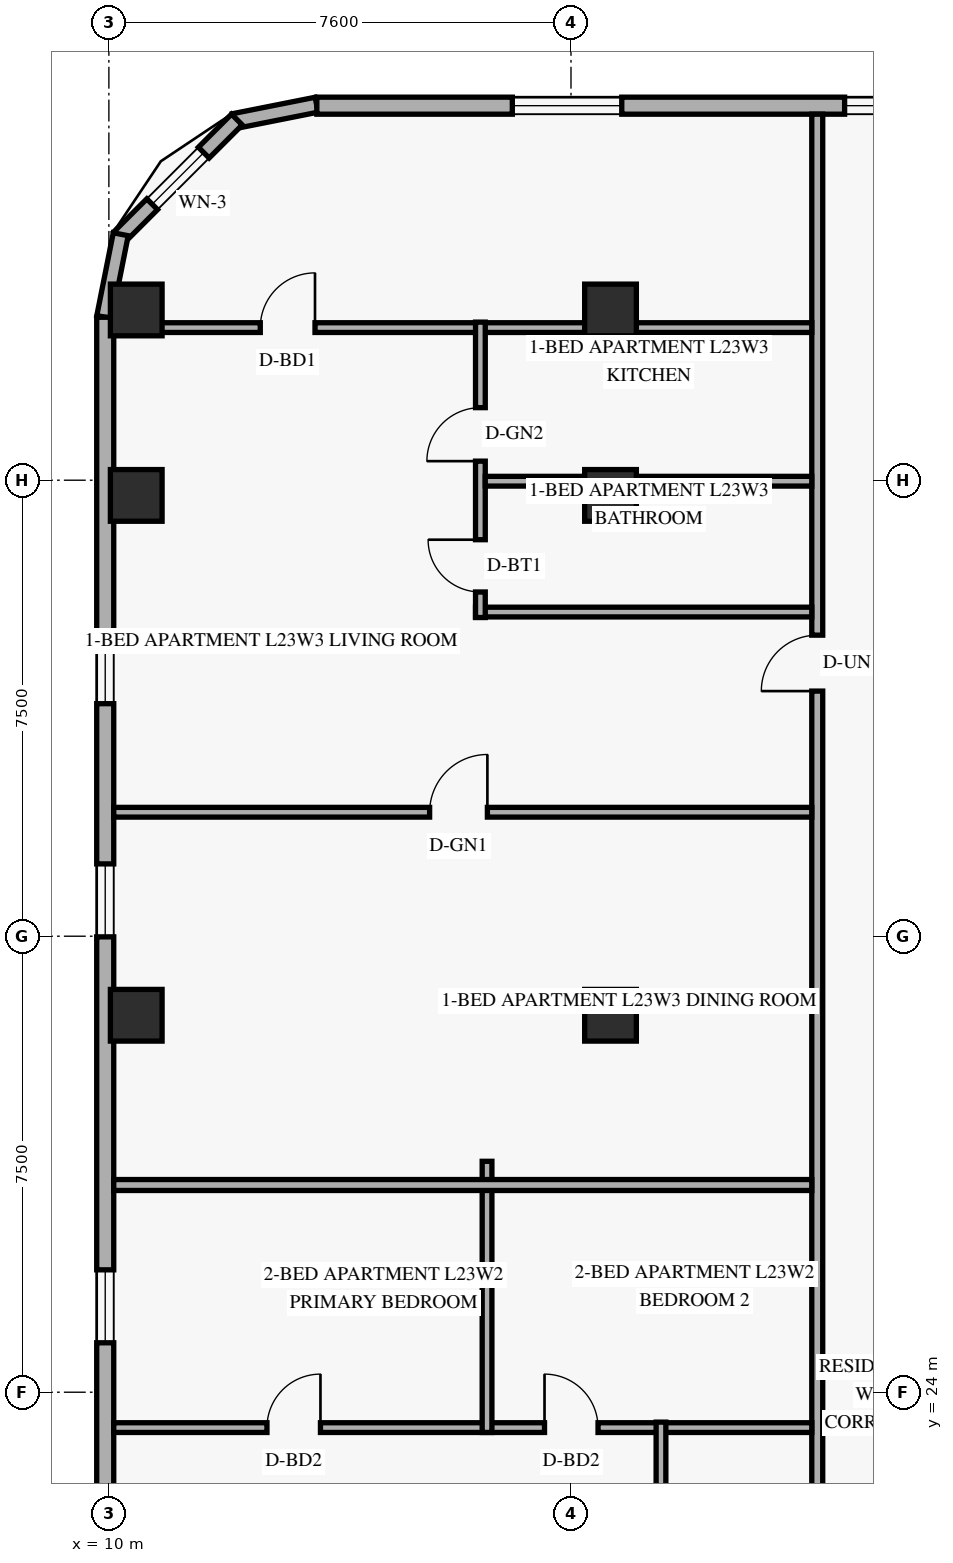
"""IFC4 building model, lengths in metres.
Left out: names, types, materials, properties, quantities, classifications, styles, units other than length and angle.
Written with IfcOpenShell. Run it as: python <this file> out.ifc"""

import sys

from ifc_helpers import new_model, si_unit, direction, frame, frame_2d, origin, origin_2d, place, context, subcontext, project, spatial, rectangle, extrude, element, fill, save


model = new_model("IFC4")
c1 = context("Model", 3, precision=1e-05, world=origin(), true_north=direction((0.0, 1.0)))
c2 = subcontext(c1, "Body", "Model", "MODEL_VIEW")
j1 = project(units=[si_unit("LENGTHUNIT", "METRE"), si_unit("PLANEANGLEUNIT", "RADIAN")], contexts=[c1])
p1 = place(None, origin())
s1 = spatial("IfcSite", under=j1, at=p1, CompositionType="ELEMENT")
p2 = place(p1, origin())
s2 = spatial("IfcBuilding", under=s1, at=p2, CompositionType="ELEMENT")
p3 = place(p2, frame((0.0, 0.0, 91.2)))
s3 = spatial("IfcBuildingStorey", under=s2, at=p3, CompositionType="ELEMENT", Elevation=91.2)
for number, where, z_axis, x_axis in (
    (1, (10.45, 30.2, 0.0), (0.0, 0.0, 1.0), (1.0, 0.0, 0.0)),
    (2, (10.45, 38.75, 0.0), (0.0, 0.0, 1.0), (1.0, 0.0, 0.0)),
    (3, (10.45, 41.8, 0.0), (0.0, 0.0, 1.0), (1.0, 0.0, 0.0)),
    (4, (18.25, 30.2, 0.0), (0.0, 0.0, 1.0), (1.0, 0.0, 0.0)),
    (5, (18.25, 38.75, 0.0), (0.0, 0.0, 1.0), (1.0, 0.0, 0.0)),
    (6, (18.25, 41.8, 0.0), (0.0, 0.0, 1.0), (1.0, 0.0, 0.0)),
):
    element("IfcColumn", number, at=place(p3, frame(where, z_axis=z_axis, x_axis=x_axis)), inside=s3, PredefinedType="COLUMN", context=c2, shape_type="SweptSolid", body=[
        extrude(rectangle(XDim=0.85, YDim=0.85, at=origin_2d()), origin(), (0.0, 0.0, 1.0), 3.6),
    ])
p4 = place(p3, frame((13.417, 45.176, 0.0), z_axis=(0.0, 0.0, 1.0), x_axis=(-0.980809899341, -0.19496651342, 0.0)))
e7 = element("IfcWall", 7, at=p4, inside=s3, PredefinedType="SOLIDWALL", context=c2, shape_type="SweptSolid", body=[
    extrude(rectangle(XDim=1.389, YDim=0.25, at=frame_2d((0.694, 0.0))), origin(), (0.0, 0.0, 1.0), 3.36),
])
p5 = place(p3, frame((12.105, 44.932, 0.0), z_axis=(0.0, 0.0, 1.0), x_axis=(-0.707151344399, -0.707062215165, 0.0)))
e8 = element("IfcWall", 8, at=p5, inside=s3, PredefinedType="SOLIDWALL", context=c2, shape_type="SweptSolid", body=[
    extrude(rectangle(XDim=2.739, YDim=0.25, at=frame_2d((1.37, 0.0))), origin(), (0.0, 0.0, 1.0), 3.36),
])
p6 = place(p5, frame((0.77, 0.0, 0.85)))
e9 = element("IfcOpeningElement", 9, at=p6, cuts=e8, PredefinedType="OPENING", context=c2, shape_type="SweptSolid", body=[
    extrude(rectangle(XDim=1.2, YDim=1.5, at=frame_2d((0.6, 0.75))), frame((0.0, 0.135, 0.0), z_axis=(0.0, -1.0, 0.0), x_axis=(1.0, 0.0, 0.0)), (0.0, 0.0, 1.0), 0.27),
])
p7 = place(p3, frame((10.195, 43.045, 0.0), z_axis=(0.0, 0.0, 1.0), x_axis=(-0.195000137217, -0.980803214965, 0.0)))
e10 = element("IfcWall", 10, at=p7, inside=s3, PredefinedType="SOLIDWALL", context=c2, shape_type="SweptSolid", body=[
    extrude(rectangle(XDim=1.388, YDim=0.25, at=frame_2d((0.694, 0.0))), origin(), (0.0, 0.0, 1.0), 3.36),
])
p8 = place(p3, frame((49.98, 45.16, 0.0), z_axis=(0.0, 0.0, 1.0), x_axis=(-1.0, 0.0, 0.0)))
e11 = element("IfcWall", 11, at=p8, inside=s3, PredefinedType="SOLIDWALL", context=c2, shape_type="SweptSolid", body=[
    extrude(rectangle(XDim=36.56, YDim=0.28, at=frame_2d((18.28, 0.0))), origin(), (0.0, 0.0, 1.0), 3.36),
])
p9 = place(p8, frame((31.545, 0.0, 0.85)))
e12 = element("IfcOpeningElement", 12, at=p9, cuts=e11, PredefinedType="OPENING", context=c2, shape_type="SweptSolid", body=[
    extrude(rectangle(XDim=1.8, YDim=1.6, at=frame_2d((0.9, 0.8))), frame((0.0, 0.15, 0.0), z_axis=(0.0, -1.0, 0.0), x_axis=(1.0, 0.0, 0.0)), (0.0, 0.0, 1.0), 0.3),
])
p10 = place(p8, frame((26.68, 0.0, 0.85)))
e13 = element("IfcOpeningElement", 13, at=p10, cuts=e11, PredefinedType="OPENING", context=c2, shape_type="SweptSolid", body=[
    extrude(rectangle(XDim=1.2, YDim=1.5, at=frame_2d((0.6, 0.75))), frame((0.0, 0.15, 0.0), z_axis=(0.0, -1.0, 0.0), x_axis=(1.0, 0.0, 0.0)), (0.0, 0.0, 1.0), 0.3),
])
p11 = place(p8, frame((22.237, 0.0, 0.85)))
e14 = element("IfcOpeningElement", 14, at=p11, cuts=e11, PredefinedType="OPENING", context=c2, shape_type="SweptSolid", body=[
    extrude(rectangle(XDim=1.8, YDim=1.6, at=frame_2d((0.9, 0.8))), frame((0.0, 0.15, 0.0), z_axis=(0.0, -1.0, 0.0), x_axis=(1.0, 0.0, 0.0)), (0.0, 0.0, 1.0), 0.3),
])
p12 = place(p8, frame((16.402, 0.0, 0.85)))
e15 = element("IfcOpeningElement", 15, at=p12, cuts=e11, PredefinedType="OPENING", context=c2, shape_type="SweptSolid", body=[
    extrude(rectangle(XDim=1.8, YDim=1.6, at=frame_2d((0.9, 0.8))), frame((0.0, 0.15, 0.0), z_axis=(0.0, -1.0, 0.0), x_axis=(1.0, 0.0, 0.0)), (0.0, 0.0, 1.0), 0.3),
])
p13 = place(p8, frame((12.895, 0.0, 0.85)))
e16 = element("IfcOpeningElement", 16, at=p13, cuts=e11, PredefinedType="OPENING", context=c2, shape_type="SweptSolid", body=[
    extrude(rectangle(XDim=1.2, YDim=1.5, at=frame_2d((0.6, 0.75))), frame((0.0, 0.15, 0.0), z_axis=(0.0, -1.0, 0.0), x_axis=(1.0, 0.0, 0.0)), (0.0, 0.0, 1.0), 0.3),
])
p14 = place(p8, frame((8.017, 0.0, 0.85)))
e17 = element("IfcOpeningElement", 17, at=p14, cuts=e11, PredefinedType="OPENING", context=c2, shape_type="SweptSolid", body=[
    extrude(rectangle(XDim=1.8, YDim=1.6, at=frame_2d((0.9, 0.8))), frame((0.0, 0.15, 0.0), z_axis=(0.0, -1.0, 0.0), x_axis=(1.0, 0.0, 0.0)), (0.0, 0.0, 1.0), 0.3),
])
p15 = place(p8, frame((1.802, 0.0, 0.85)))
e18 = element("IfcOpeningElement", 18, at=p15, cuts=e11, PredefinedType="OPENING", context=c2, shape_type="SweptSolid", body=[
    extrude(rectangle(XDim=1.8, YDim=1.6, at=frame_2d((0.9, 0.8))), frame((0.0, 0.15, 0.0), z_axis=(0.0, -1.0, 0.0), x_axis=(1.0, 0.0, 0.0)), (0.0, 0.0, 1.0), 0.3),
])
p16 = place(p3, frame((9.94, 41.68, 0.0), z_axis=(0.0, 0.0, 1.0), x_axis=(0.0, -1.0, 0.0)))
e19 = element("IfcWall", 19, at=p16, inside=s3, PredefinedType="SOLIDWALL", context=c2, shape_type="SweptSolid", body=[
    extrude(rectangle(XDim=35.36, YDim=0.28, at=frame_2d((17.68, 0.0))), origin(), (0.0, 0.0, 1.0), 3.36),
])
p17 = place(p16, frame((29.347, 0.0, 0.85)))
e20 = element("IfcOpeningElement", 20, at=p17, cuts=e19, PredefinedType="OPENING", context=c2, shape_type="SweptSolid", body=[
    extrude(rectangle(XDim=1.2, YDim=1.5, at=frame_2d((0.6, 0.75))), frame((0.0, 0.15, 0.0), z_axis=(0.0, -1.0, 0.0), x_axis=(1.0, 0.0, 0.0)), (0.0, 0.0, 1.0), 0.3),
])
p18 = place(p16, frame((25.867, 0.0, 0.85)))
e21 = element("IfcOpeningElement", 21, at=p18, cuts=e19, PredefinedType="OPENING", context=c2, shape_type="SweptSolid", body=[
    extrude(rectangle(XDim=1.2, YDim=1.5, at=frame_2d((0.6, 0.75))), frame((0.0, 0.15, 0.0), z_axis=(0.0, -1.0, 0.0), x_axis=(1.0, 0.0, 0.0)), (0.0, 0.0, 1.0), 0.3),
])
p19 = place(p16, frame((20.376, 0.0, 0.85)))
e22 = element("IfcOpeningElement", 22, at=p19, cuts=e19, PredefinedType="OPENING", context=c2, shape_type="SweptSolid", body=[
    extrude(rectangle(XDim=1.2, YDim=1.5, at=frame_2d((0.6, 0.75))), frame((0.0, 0.15, 0.0), z_axis=(0.0, -1.0, 0.0), x_axis=(1.0, 0.0, 0.0)), (0.0, 0.0, 1.0), 0.3),
])
p20 = place(p16, frame((15.667, 0.0, 0.85)))
e23 = element("IfcOpeningElement", 23, at=p20, cuts=e19, PredefinedType="OPENING", context=c2, shape_type="SweptSolid", body=[
    extrude(rectangle(XDim=1.2, YDim=1.5, at=frame_2d((0.6, 0.75))), frame((0.0, 0.15, 0.0), z_axis=(0.0, -1.0, 0.0), x_axis=(1.0, 0.0, 0.0)), (0.0, 0.0, 1.0), 0.3),
])
p21 = place(p16, frame((8.99, 0.0, 0.85)))
e24 = element("IfcOpeningElement", 24, at=p21, cuts=e19, PredefinedType="OPENING", context=c2, shape_type="SweptSolid", body=[
    extrude(rectangle(XDim=1.2, YDim=1.5, at=frame_2d((0.6, 0.75))), frame((0.0, 0.15, 0.0), z_axis=(0.0, -1.0, 0.0), x_axis=(1.0, 0.0, 0.0)), (0.0, 0.0, 1.0), 0.3),
])
p22 = place(p16, frame((5.156, 0.0, 0.85)))
e25 = element("IfcOpeningElement", 25, at=p22, cuts=e19, PredefinedType="OPENING", context=c2, shape_type="SweptSolid", body=[
    extrude(rectangle(XDim=1.2, YDim=1.5, at=frame_2d((0.6, 0.75))), frame((0.0, 0.15, 0.0), z_axis=(0.0, -1.0, 0.0), x_axis=(1.0, 0.0, 0.0)), (0.0, 0.0, 1.0), 0.3),
])
p23 = place(p3, frame((21.65, 2.98, 0.0), z_axis=(0.0, 0.0, 1.0), x_axis=(0.0, 1.0, 0.0)))
e26 = element("IfcWall", 26, at=p23, inside=s3, PredefinedType="STANDARD", context=c2, shape_type="SweptSolid", body=[
    extrude(rectangle(XDim=42.04, YDim=0.18, at=frame_2d((21.02, 0.0))), origin(), (0.0, 0.0, 1.0), 2.731),
])
p24 = place(p23, frame((4.856, 0.0, 0.0)))
e27 = element("IfcOpeningElement", 27, at=p24, cuts=e26, PredefinedType="OPENING", context=c2, shape_type="SweptSolid", body=[
    extrude(rectangle(XDim=0.92, YDim=2.15, at=frame_2d((0.46, 1.075))), frame((0.0, 0.1, 0.0), z_axis=(0.0, -1.0, 0.0), x_axis=(1.0, 0.0, 0.0)), (0.0, 0.0, 1.0), 0.2),
])
p25 = place(p23, frame((14.488, 0.0, 0.0)))
e28 = element("IfcOpeningElement", 28, at=p25, cuts=e26, PredefinedType="OPENING", context=c2, shape_type="SweptSolid", body=[
    extrude(rectangle(XDim=0.92, YDim=2.15, at=frame_2d((0.46, 1.075))), frame((0.0, 0.1, 0.0), z_axis=(0.0, -1.0, 0.0), x_axis=(1.0, 0.0, 0.0)), (0.0, 0.0, 1.0), 0.2),
])
p26 = place(p23, frame((32.552, 0.0, 0.0)))
e29 = element("IfcOpeningElement", 29, at=p26, cuts=e26, PredefinedType="OPENING", context=c2, shape_type="SweptSolid", body=[
    extrude(rectangle(XDim=0.92, YDim=2.15, at=frame_2d((0.46, 1.075))), frame((0.0, 0.1, 0.0), z_axis=(0.0, -1.0, 0.0), x_axis=(1.0, 0.0, 0.0)), (0.0, 0.0, 1.0), 0.2),
])
p27 = place(p3, frame((10.08, 23.418, 0.0), z_axis=(0.0, 0.0, 1.0), x_axis=(1.0, 0.0, 0.0)))
e30 = element("IfcWall", 30, at=p27, inside=s3, PredefinedType="PARTITIONING", context=c2, shape_type="SweptSolid", body=[
    extrude(rectangle(XDim=11.48, YDim=0.16, at=frame_2d((5.74, 0.0))), origin(), (0.0, 0.0, 1.0), 2.731),
])
p28 = place(p27, frame((2.52, 0.0, 0.0)))
e31 = element("IfcOpeningElement", 31, at=p28, cuts=e30, PredefinedType="OPENING", context=c2, shape_type="SweptSolid", body=[
    extrude(rectangle(XDim=0.88, YDim=2.14, at=frame_2d((0.44, 1.07))), frame((0.0, 0.09, 0.0), z_axis=(0.0, -1.0, 0.0), x_axis=(1.0, 0.0, 0.0)), (0.0, 0.0, 1.0), 0.18),
])
p29 = place(p27, frame((7.085, 0.0, 0.0)))
e32 = element("IfcOpeningElement", 32, at=p29, cuts=e30, PredefinedType="OPENING", context=c2, shape_type="SweptSolid", body=[
    extrude(rectangle(XDim=0.88, YDim=2.14, at=frame_2d((0.44, 1.07))), frame((0.0, 0.09, 0.0), z_axis=(0.0, -1.0, 0.0), x_axis=(1.0, 0.0, 0.0)), (0.0, 0.0, 1.0), 0.18),
])
p30 = place(p3, frame((19.08, 18.678, 0.0), z_axis=(0.0, 0.0, 1.0), x_axis=(0.0, 1.0, 0.0)))
e33 = element("IfcWall", 33, at=p30, inside=s3, PredefinedType="PLUMBINGWALL", context=c2, shape_type="SweptSolid", body=[
    extrude(rectangle(XDim=4.83, YDim=0.16, at=frame_2d((2.415, 0.0))), origin(), (0.0, 0.0, 1.0), 3.36),
])
p31 = place(p30, frame((0.42, 0.0, 0.0)))
e34 = element("IfcOpeningElement", 34, at=p31, cuts=e33, PredefinedType="OPENING", context=c2, shape_type="SweptSolid", body=[
    extrude(rectangle(XDim=0.86, YDim=2.12, at=frame_2d((0.43, 1.06))), frame((0.0, 0.09, 0.0), z_axis=(0.0, -1.0, 0.0), x_axis=(1.0, 0.0, 0.0)), (0.0, 0.0, 1.0), 0.18),
])
p32 = place(p30, frame((2.559, 0.0, 0.0)))
e35 = element("IfcOpeningElement", 35, at=p32, cuts=e33, PredefinedType="OPENING", context=c2, shape_type="SweptSolid", body=[
    extrude(rectangle(XDim=0.88, YDim=2.12, at=frame_2d((0.44, 1.06))), frame((0.0, 0.09, 0.0), z_axis=(0.0, -1.0, 0.0), x_axis=(1.0, 0.0, 0.0)), (0.0, 0.0, 1.0), 0.18),
])
p33 = place(p3, frame((16.219, 23.338, 0.0), z_axis=(0.0, 0.0, 1.0), x_axis=(0.0, 1.0, 0.0)))
e36 = element("IfcWall", 36, at=p33, inside=s3, PredefinedType="PARTITIONING", context=c2, shape_type="SweptSolid", body=[
    extrude(rectangle(XDim=4.46, YDim=0.16, at=frame_2d((2.23, 0.0))), origin(), (0.0, 0.0, 1.0), 2.731),
])
p34 = place(p3, frame((10.08, 27.408, 0.0), z_axis=(0.0, 0.0, 1.0), x_axis=(1.0, 0.0, 0.0)))
e37 = element("IfcWall", 37, at=p34, inside=s3, PredefinedType="PARTITIONING", context=c2, shape_type="SweptSolid", body=[
    extrude(rectangle(XDim=11.48, YDim=0.18, at=frame_2d((5.74, 0.0))), origin(), (0.0, 0.0, 1.0), 2.731),
])
p35 = place(p3, frame((10.08, 41.51, 0.0), z_axis=(0.0, 0.0, 1.0), x_axis=(1.0, 0.0, 0.0)))
e38 = element("IfcWall", 38, at=p35, inside=s3, PredefinedType="PARTITIONING", context=c2, shape_type="SweptSolid", body=[
    extrude(rectangle(XDim=11.48, YDim=0.16, at=frame_2d((5.74, 0.0))), origin(), (0.0, 0.0, 1.0), 3.36),
])
p36 = place(p35, frame((2.41, 0.0, 0.0)))
e39 = element("IfcOpeningElement", 39, at=p36, cuts=e38, PredefinedType="OPENING", context=c2, shape_type="SweptSolid", body=[
    extrude(rectangle(XDim=0.9, YDim=2.14, at=frame_2d((0.45, 1.07))), frame((0.0, 0.09, 0.0), z_axis=(0.0, -1.0, 0.0), x_axis=(1.0, 0.0, 0.0)), (0.0, 0.0, 1.0), 0.18),
])
p37 = place(p3, frame((16.03, 36.832, 0.0), z_axis=(0.0, 0.0, 1.0), x_axis=(1.0, 0.0, 0.0)))
e40 = element("IfcWall", 40, at=p37, inside=s3, PredefinedType="PLUMBINGWALL", context=c2, shape_type="SweptSolid", body=[
    extrude(rectangle(XDim=5.53, YDim=0.16, at=frame_2d((2.765, 0.0))), origin(), (0.0, 0.0, 1.0), 2.731),
])
p38 = place(p3, frame((16.11, 36.741, 0.0), z_axis=(0.0, 0.0, 1.0), x_axis=(0.0, 1.0, 0.0)))
e41 = element("IfcWall", 41, at=p38, inside=s3, PredefinedType="PLUMBINGWALL", context=c2, shape_type="SweptSolid", body=[
    extrude(rectangle(XDim=4.859, YDim=0.16, at=frame_2d((2.429, 0.0))), origin(), (0.0, 0.0, 1.0), 2.731),
])
p39 = place(p38, frame((0.42, 0.0, 0.0)))
e42 = element("IfcOpeningElement", 42, at=p39, cuts=e41, PredefinedType="OPENING", context=c2, shape_type="SweptSolid", body=[
    extrude(rectangle(XDim=0.86, YDim=2.12, at=frame_2d((0.43, 1.06))), frame((0.0, 0.09, 0.0), z_axis=(0.0, -1.0, 0.0), x_axis=(1.0, 0.0, 0.0)), (0.0, 0.0, 1.0), 0.18),
])
p40 = place(p38, frame((2.572, 0.0, 0.0)))
e43 = element("IfcOpeningElement", 43, at=p40, cuts=e41, PredefinedType="OPENING", context=c2, shape_type="SweptSolid", body=[
    extrude(rectangle(XDim=0.88, YDim=2.12, at=frame_2d((0.44, 1.06))), frame((0.0, 0.09, 0.0), z_axis=(0.0, -1.0, 0.0), x_axis=(1.0, 0.0, 0.0)), (0.0, 0.0, 1.0), 0.18),
])
p41 = place(p3, frame((16.19, 38.984, 0.0), z_axis=(0.0, 0.0, 1.0), x_axis=(1.0, 0.0, 0.0)))
e44 = element("IfcWall", 44, at=p41, inside=s3, PredefinedType="PLUMBINGWALL", context=c2, shape_type="SweptSolid", body=[
    extrude(rectangle(XDim=5.37, YDim=0.16, at=frame_2d((2.685, 0.0))), origin(), (0.0, 0.0, 1.0), 2.731),
])
p42 = place(p3, frame((10.08, 33.539, 0.0), z_axis=(0.0, 0.0, 1.0), x_axis=(1.0, 0.0, 0.0)))
e45 = element("IfcWall", 45, at=p42, inside=s3, PredefinedType="PARTITIONING", context=c2, shape_type="SweptSolid", body=[
    extrude(rectangle(XDim=11.48, YDim=0.16, at=frame_2d((5.74, 0.0))), origin(), (0.0, 0.0, 1.0), 2.731),
])
p43 = place(p42, frame((5.195, 0.0, 0.0)))
e46 = element("IfcOpeningElement", 46, at=p43, cuts=e45, PredefinedType="OPENING", context=c2, shape_type="SweptSolid", body=[
    extrude(rectangle(XDim=0.95, YDim=2.15, at=frame_2d((0.475, 1.075))), frame((0.0, 0.09, 0.0), z_axis=(0.0, -1.0, 0.0), x_axis=(1.0, 0.0, 0.0)), (0.0, 0.0, 1.0), 0.18),
])
p44 = place(p6, origin())
e47 = element("IfcWindow", 47, at=p44, inside=s3, PartitioningType="SINGLE_PANEL", PredefinedType="WINDOW", context=c2, shape_type="SweptSolid", body=[
    extrude(rectangle(XDim=1.2, YDim=1.5, at=frame_2d((0.6, 0.75))), frame((0.0, 0.03, 0.0), z_axis=(0.0, -1.0, 0.0), x_axis=(1.0, 0.0, 0.0)), (0.0, 0.0, 1.0), 0.06),
])
fill(e9, e47)
p45 = place(p9, origin())
e48 = element("IfcWindow", 48, at=p45, inside=s3, PartitioningType="SINGLE_PANEL", PredefinedType="WINDOW", context=c2, shape_type="SweptSolid", body=[
    extrude(rectangle(XDim=1.8, YDim=1.6, at=frame_2d((0.9, 0.8))), frame((0.0, 0.03, 0.0), z_axis=(0.0, -1.0, 0.0), x_axis=(1.0, 0.0, 0.0)), (0.0, 0.0, 1.0), 0.06),
])
fill(e12, e48)
p46 = place(p10, origin())
e49 = element("IfcWindow", 49, at=p46, inside=s3, PartitioningType="SINGLE_PANEL", PredefinedType="WINDOW", context=c2, shape_type="SweptSolid", body=[
    extrude(rectangle(XDim=1.2, YDim=1.5, at=frame_2d((0.6, 0.75))), frame((0.0, 0.03, 0.0), z_axis=(0.0, -1.0, 0.0), x_axis=(1.0, 0.0, 0.0)), (0.0, 0.0, 1.0), 0.06),
])
fill(e13, e49)
p47 = place(p20, origin())
e50 = element("IfcWindow", 50, at=p47, inside=s3, PartitioningType="SINGLE_PANEL", PredefinedType="WINDOW", context=c2, shape_type="SweptSolid", body=[
    extrude(rectangle(XDim=1.2, YDim=1.5, at=frame_2d((0.6, 0.75))), frame((0.0, 0.03, 0.0), z_axis=(0.0, -1.0, 0.0), x_axis=(1.0, 0.0, 0.0)), (0.0, 0.0, 1.0), 0.06),
])
fill(e23, e50)
p48 = place(p21, origin())
e51 = element("IfcWindow", 51, at=p48, inside=s3, PartitioningType="SINGLE_PANEL", PredefinedType="WINDOW", context=c2, shape_type="SweptSolid", body=[
    extrude(rectangle(XDim=1.2, YDim=1.5, at=frame_2d((0.6, 0.75))), frame((0.0, 0.03, 0.0), z_axis=(0.0, -1.0, 0.0), x_axis=(1.0, 0.0, 0.0)), (0.0, 0.0, 1.0), 0.06),
])
fill(e24, e51)
p49 = place(p22, origin())
e52 = element("IfcWindow", 52, at=p49, inside=s3, PartitioningType="SINGLE_PANEL", PredefinedType="WINDOW", context=c2, shape_type="SweptSolid", body=[
    extrude(rectangle(XDim=1.2, YDim=1.5, at=frame_2d((0.6, 0.75))), frame((0.0, 0.03, 0.0), z_axis=(0.0, -1.0, 0.0), x_axis=(1.0, 0.0, 0.0)), (0.0, 0.0, 1.0), 0.06),
])
fill(e25, e52)
p50 = place(p28, origin())
e53 = element("IfcDoor", 53, at=p50, inside=s3, OperationType="SINGLE_SWING_RIGHT", PredefinedType="DOOR", context=c2, shape_type="SweptSolid", body=[
    extrude(rectangle(XDim=0.88, YDim=2.14, at=frame_2d((0.44, 1.07))), frame((0.0, 0.025, 0.0), z_axis=(0.0, -1.0, 0.0), x_axis=(1.0, 0.0, 0.0)), (0.0, 0.0, 1.0), 0.05),
])
fill(e31, e53)
p51 = place(p29, origin())
e54 = element("IfcDoor", 54, at=p51, inside=s3, OperationType="SINGLE_SWING_LEFT", PredefinedType="DOOR", context=c2, shape_type="SweptSolid", body=[
    extrude(rectangle(XDim=0.88, YDim=2.14, at=frame_2d((0.44, 1.07))), frame((0.0, 0.025, 0.0), z_axis=(0.0, -1.0, 0.0), x_axis=(1.0, 0.0, 0.0)), (0.0, 0.0, 1.0), 0.05),
])
fill(e32, e54)
p52 = place(p43, origin())
e55 = element("IfcDoor", 55, at=p52, inside=s3, OperationType="SINGLE_SWING_RIGHT", PredefinedType="DOOR", context=c2, shape_type="SweptSolid", body=[
    extrude(rectangle(XDim=0.95, YDim=2.15, at=frame_2d((0.475, 1.075))), frame((0.0, 0.025, 0.0), z_axis=(0.0, -1.0, 0.0), x_axis=(1.0, 0.0, 0.0)), (0.0, 0.0, 1.0), 0.05),
])
fill(e46, e55)
p53 = place(p26, origin())
e56 = element("IfcDoor", 56, at=p53, inside=s3, OperationType="SINGLE_SWING_LEFT", PredefinedType="DOOR", context=c2, shape_type="SweptSolid", body=[
    extrude(rectangle(XDim=0.92, YDim=2.15, at=frame_2d((0.46, 1.075))), frame((0.0, 0.025, 0.0), z_axis=(0.0, -1.0, 0.0), x_axis=(1.0, 0.0, 0.0)), (0.0, 0.0, 1.0), 0.05),
])
fill(e29, e56)
p54 = place(p39, origin())
e57 = element("IfcDoor", 57, at=p54, inside=s3, OperationType="SINGLE_SWING_RIGHT", PredefinedType="DOOR", context=c2, shape_type="SweptSolid", body=[
    extrude(rectangle(XDim=0.86, YDim=2.12, at=frame_2d((0.43, 1.06))), frame((0.0, 0.025, 0.0), z_axis=(0.0, -1.0, 0.0), x_axis=(1.0, 0.0, 0.0)), (0.0, 0.0, 1.0), 0.05),
])
fill(e42, e57)
p55 = place(p40, origin())
e58 = element("IfcDoor", 58, at=p55, inside=s3, OperationType="SINGLE_SWING_LEFT", PredefinedType="DOOR", context=c2, shape_type="SweptSolid", body=[
    extrude(rectangle(XDim=0.88, YDim=2.12, at=frame_2d((0.44, 1.06))), frame((0.0, 0.025, 0.0), z_axis=(0.0, -1.0, 0.0), x_axis=(1.0, 0.0, 0.0)), (0.0, 0.0, 1.0), 0.05),
])
fill(e43, e58)
p56 = place(p36, origin())
e59 = element("IfcDoor", 59, at=p56, inside=s3, OperationType="SINGLE_SWING_RIGHT", PredefinedType="DOOR", context=c2, shape_type="SweptSolid", body=[
    extrude(rectangle(XDim=0.9, YDim=2.14, at=frame_2d((0.45, 1.07))), frame((0.0, 0.025, 0.0), z_axis=(0.0, -1.0, 0.0), x_axis=(1.0, 0.0, 0.0)), (0.0, 0.0, 1.0), 0.05),
])
fill(e39, e59)
save(model, sys.argv[1])
